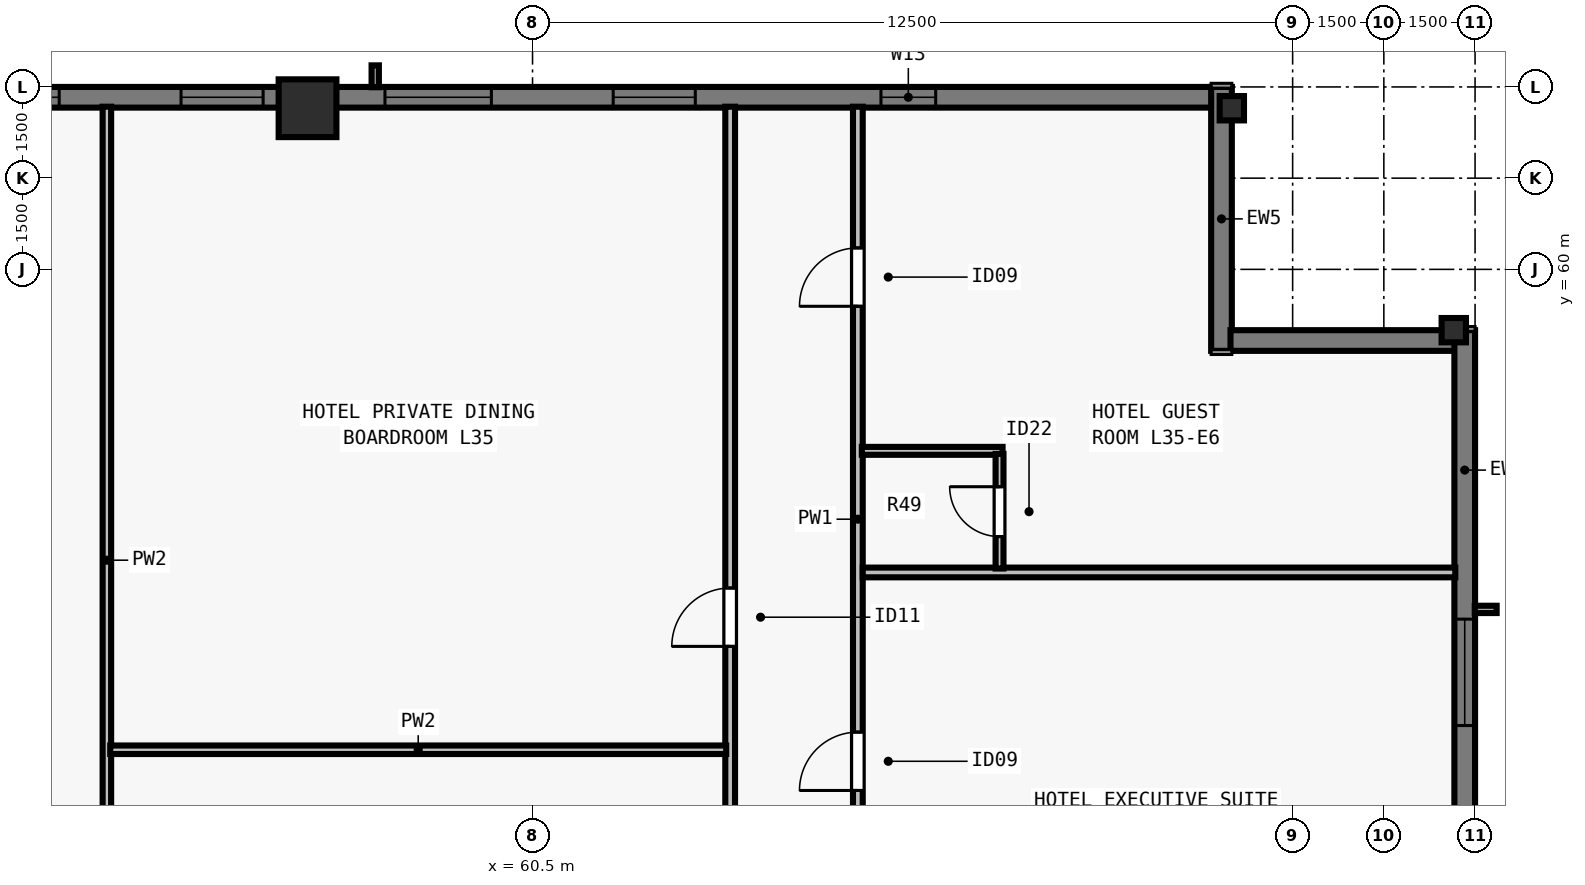
"""IFC4 building model, lengths in metres.
Left out: names, types, materials, properties, quantities, classifications, styles, units other than length and angle.
Written with IfcOpenShell. Run it as: python <this file> out.ifc"""

import sys

from ifc_helpers import new_model, si_unit, direction, frame, frame_2d, origin, origin_2d, place, context, subcontext, project, spatial, rectangle, i_section, extrude, element, fill, save


model = new_model("IFC4")
c1 = context("Model", 3, precision=1e-05, world=origin(), true_north=direction((0.0, 1.0)))
c2 = subcontext(c1, "Body", "Model", "MODEL_VIEW")
j1 = project(units=[si_unit("LENGTHUNIT", "METRE"), si_unit("PLANEANGLEUNIT", "RADIAN")], contexts=[c1])
p1 = place(None, origin())
s1 = spatial("IfcSite", under=j1, at=p1, CompositionType="ELEMENT")
p2 = place(p1, origin())
s2 = spatial("IfcBuilding", under=s1, at=p2, CompositionType="ELEMENT")
p3 = place(p2, frame((0.0, 0.0, 130.5)))
s3 = spatial("IfcBuildingStorey", under=s2, at=p3, CompositionType="ELEMENT", Elevation=130.5)
for number, where, z_axis, x_axis in (
    (1, (75.65, 59.0, 0.0), (0.0, 0.0, 1.0), (0.0, 1.0, 0.0)),
    (2, (72.0, 62.65, 0.0), (0.0, 0.0, 1.0), (1.0, 0.0, 0.0)),
):
    element("IfcColumn", number, at=place(p3, frame(where, z_axis=z_axis, x_axis=x_axis)), inside=s3, PredefinedType="COLUMN", context=c2, shape_type="SweptSolid", body=[
        extrude(i_section(OverallWidth=0.4, OverallDepth=0.4, WebThickness=0.022, FlangeThickness=0.036, at=origin_2d()), origin(), (0.0, 0.0, 1.0), 3.5),
    ])
p4 = place(p3, frame((56.8, 62.65, 0.0), z_axis=(0.0, 0.0, 1.0), x_axis=(1.0, 0.0, 0.0)))
e3 = element("IfcColumn", 3, at=p4, inside=s3, PredefinedType="COLUMN", context=c2, shape_type="SweptSolid", body=[
    extrude(rectangle(XDim=0.95, YDim=0.95, at=origin_2d()), origin(), (0.0, 0.0, 1.0), 3.5),
])
p5 = place(p3, frame((32.0, 62.83, 0.0), z_axis=(0.0, 0.0, 1.0), x_axis=(1.0, 0.0, 0.0)))
e4 = element("IfcWall", 4, at=p5, inside=s3, PredefinedType="SOLIDWALL", context=c2, shape_type="SweptSolid", body=[
    extrude(rectangle(XDim=39.682, YDim=0.34, at=frame_2d((19.841, 0.0))), origin(), (0.0, 0.0, 1.0), 3.28),
])
p6 = place(p5, frame((4.752, 0.0, 0.8)))
e5 = element("IfcOpeningElement", 5, at=p6, cuts=e4, PredefinedType="OPENING", context=c2, shape_type="SweptSolid", body=[
    extrude(rectangle(XDim=1.75, YDim=1.66, at=frame_2d((0.875, 0.83))), frame((0.0, 0.18, 0.0), z_axis=(0.0, -1.0, 0.0), x_axis=(1.0, 0.0, 0.0)), (0.0, 0.0, 1.0), 0.36),
])
p7 = place(p5, frame((11.859, 0.0, 0.8)))
e6 = element("IfcOpeningElement", 6, at=p7, cuts=e4, PredefinedType="OPENING", context=c2, shape_type="SweptSolid", body=[
    extrude(rectangle(XDim=1.75, YDim=1.66, at=frame_2d((0.875, 0.83))), frame((0.0, 0.18, 0.0), z_axis=(0.0, -1.0, 0.0), x_axis=(1.0, 0.0, 0.0)), (0.0, 0.0, 1.0), 0.36),
])
p8 = place(p5, frame((16.062, 0.0, 0.8)))
e7 = element("IfcOpeningElement", 7, at=p8, cuts=e4, PredefinedType="OPENING", context=c2, shape_type="SweptSolid", body=[
    extrude(rectangle(XDim=1.35, YDim=1.66, at=frame_2d((0.675, 0.83))), frame((0.0, 0.18, 0.0), z_axis=(0.0, -1.0, 0.0), x_axis=(1.0, 0.0, 0.0)), (0.0, 0.0, 1.0), 0.36),
])
p9 = place(p5, frame((18.966, 0.0, 0.8)))
e8 = element("IfcOpeningElement", 8, at=p9, cuts=e4, PredefinedType="OPENING", context=c2, shape_type="SweptSolid", body=[
    extrude(rectangle(XDim=1.75, YDim=1.66, at=frame_2d((0.875, 0.83))), frame((0.0, 0.18, 0.0), z_axis=(0.0, -1.0, 0.0), x_axis=(1.0, 0.0, 0.0)), (0.0, 0.0, 1.0), 0.36),
])
p10 = place(p5, frame((22.719, 0.0, 0.8)))
e9 = element("IfcOpeningElement", 9, at=p10, cuts=e4, PredefinedType="OPENING", context=c2, shape_type="SweptSolid", body=[
    extrude(rectangle(XDim=1.35, YDim=1.66, at=frame_2d((0.675, 0.83))), frame((0.0, 0.18, 0.0), z_axis=(0.0, -1.0, 0.0), x_axis=(1.0, 0.0, 0.0)), (0.0, 0.0, 1.0), 0.36),
])
p11 = place(p5, frame((26.073, 0.0, 0.8)))
e10 = element("IfcOpeningElement", 10, at=p11, cuts=e4, PredefinedType="OPENING", context=c2, shape_type="SweptSolid", body=[
    extrude(rectangle(XDim=1.75, YDim=1.66, at=frame_2d((0.875, 0.83))), frame((0.0, 0.18, 0.0), z_axis=(0.0, -1.0, 0.0), x_axis=(1.0, 0.0, 0.0)), (0.0, 0.0, 1.0), 0.36),
])
p12 = place(p5, frame((29.827, 0.0, 0.8)))
e11 = element("IfcOpeningElement", 11, at=p12, cuts=e4, PredefinedType="OPENING", context=c2, shape_type="SweptSolid", body=[
    extrude(rectangle(XDim=1.35, YDim=1.66, at=frame_2d((0.675, 0.83))), frame((0.0, 0.18, 0.0), z_axis=(0.0, -1.0, 0.0), x_axis=(1.0, 0.0, 0.0)), (0.0, 0.0, 1.0), 0.36),
])
p13 = place(p5, frame((34.23, 0.0, 0.8)))
e12 = element("IfcOpeningElement", 12, at=p13, cuts=e4, PredefinedType="OPENING", context=c2, shape_type="SweptSolid", body=[
    extrude(rectangle(XDim=0.9, YDim=1.66, at=frame_2d((0.45, 0.83))), frame((0.0, 0.18, 0.0), z_axis=(0.0, -1.0, 0.0), x_axis=(1.0, 0.0, 0.0)), (0.0, 0.0, 1.0), 0.36),
])
p14 = place(p3, frame((71.83, 63.0, 0.0), z_axis=(0.0, 0.0, 1.0), x_axis=(0.0, -1.0, 0.0)))
e13 = element("IfcWall", 13, at=p14, inside=s3, PredefinedType="SOLIDWALL", context=c2, shape_type="SweptSolid", body=[
    extrude(rectangle(XDim=4.34, YDim=0.34, at=frame_2d((2.17, 0.0))), origin(), (0.0, 0.0, 1.0), 3.28),
])
p15 = place(p3, frame((71.978, 58.83, 0.0), z_axis=(0.0, 0.0, 1.0), x_axis=(1.0, 0.0, 0.0)))
e14 = element("IfcWall", 14, at=p15, inside=s3, PredefinedType="SOLIDWALL", context=c2, shape_type="SweptSolid", body=[
    extrude(rectangle(XDim=3.704, YDim=0.34, at=frame_2d((1.852, 0.0))), origin(), (0.0, 0.0, 1.0), 3.28),
])
p16 = place(p3, frame((75.83, 59.0, 0.0), z_axis=(0.0, 0.0, 1.0), x_axis=(0.0, -1.0, 0.0)))
e15 = element("IfcWall", 15, at=p16, inside=s3, PredefinedType="SOLIDWALL", context=c2, shape_type="SweptSolid", body=[
    extrude(rectangle(XDim=39.682, YDim=0.34, at=frame_2d((19.841, 0.0))), origin(), (0.0, 0.0, 1.0), 3.28),
])
p17 = place(p16, frame((4.752, 0.0, 0.8)))
e16 = element("IfcOpeningElement", 16, at=p17, cuts=e15, PredefinedType="OPENING", context=c2, shape_type="SweptSolid", body=[
    extrude(rectangle(XDim=1.75, YDim=1.66, at=frame_2d((0.875, 0.83))), frame((0.0, 0.18, 0.0), z_axis=(0.0, -1.0, 0.0), x_axis=(1.0, 0.0, 0.0)), (0.0, 0.0, 1.0), 0.36),
])
p18 = place(p16, frame((8.505, 0.0, 0.8)))
e17 = element("IfcOpeningElement", 17, at=p18, cuts=e15, PredefinedType="OPENING", context=c2, shape_type="SweptSolid", body=[
    extrude(rectangle(XDim=1.35, YDim=1.66, at=frame_2d((0.675, 0.83))), frame((0.0, 0.18, 0.0), z_axis=(0.0, -1.0, 0.0), x_axis=(1.0, 0.0, 0.0)), (0.0, 0.0, 1.0), 0.36),
])
p19 = place(p16, frame((12.709, 0.0, 0.8)))
e18 = element("IfcOpeningElement", 18, at=p19, cuts=e15, PredefinedType="OPENING", context=c2, shape_type="SweptSolid", body=[
    extrude(rectangle(XDim=1.75, YDim=1.66, at=frame_2d((0.875, 0.83))), frame((0.0, 0.18, 0.0), z_axis=(0.0, -1.0, 0.0), x_axis=(1.0, 0.0, 0.0)), (0.0, 0.0, 1.0), 0.36),
])
p20 = place(p16, frame((16.062, 0.0, 0.8)))
e19 = element("IfcOpeningElement", 19, at=p20, cuts=e15, PredefinedType="OPENING", context=c2, shape_type="SweptSolid", body=[
    extrude(rectangle(XDim=1.35, YDim=1.66, at=frame_2d((0.675, 0.83))), frame((0.0, 0.18, 0.0), z_axis=(0.0, -1.0, 0.0), x_axis=(1.0, 0.0, 0.0)), (0.0, 0.0, 1.0), 0.36),
])
p21 = place(p16, frame((20.216, 0.0, 0.8)))
e20 = element("IfcOpeningElement", 20, at=p21, cuts=e15, PredefinedType="OPENING", context=c2, shape_type="SweptSolid", body=[
    extrude(rectangle(XDim=1.75, YDim=1.66, at=frame_2d((0.875, 0.83))), frame((0.0, 0.18, 0.0), z_axis=(0.0, -1.0, 0.0), x_axis=(1.0, 0.0, 0.0)), (0.0, 0.0, 1.0), 0.36),
])
p22 = place(p16, frame((22.719, 0.0, 0.8)))
e21 = element("IfcOpeningElement", 21, at=p22, cuts=e15, PredefinedType="OPENING", context=c2, shape_type="SweptSolid", body=[
    extrude(rectangle(XDim=1.35, YDim=1.66, at=frame_2d((0.675, 0.83))), frame((0.0, 0.18, 0.0), z_axis=(0.0, -1.0, 0.0), x_axis=(1.0, 0.0, 0.0)), (0.0, 0.0, 1.0), 0.36),
])
p23 = place(p16, frame((25.623, 0.0, 0.8)))
e22 = element("IfcOpeningElement", 22, at=p23, cuts=e15, PredefinedType="OPENING", context=c2, shape_type="SweptSolid", body=[
    extrude(rectangle(XDim=1.75, YDim=1.66, at=frame_2d((0.875, 0.83))), frame((0.0, 0.18, 0.0), z_axis=(0.0, -1.0, 0.0), x_axis=(1.0, 0.0, 0.0)), (0.0, 0.0, 1.0), 0.36),
])
p24 = place(p16, frame((29.827, 0.0, 0.8)))
e23 = element("IfcOpeningElement", 23, at=p24, cuts=e15, PredefinedType="OPENING", context=c2, shape_type="SweptSolid", body=[
    extrude(rectangle(XDim=1.35, YDim=1.66, at=frame_2d((0.675, 0.83))), frame((0.0, 0.18, 0.0), z_axis=(0.0, -1.0, 0.0), x_axis=(1.0, 0.0, 0.0)), (0.0, 0.0, 1.0), 0.36),
])
p25 = place(p16, frame((33.18, 0.0, 0.8)))
e24 = element("IfcOpeningElement", 24, at=p25, cuts=e15, PredefinedType="OPENING", context=c2, shape_type="SweptSolid", body=[
    extrude(rectangle(XDim=1.75, YDim=1.66, at=frame_2d((0.875, 0.83))), frame((0.0, 0.18, 0.0), z_axis=(0.0, -1.0, 0.0), x_axis=(1.0, 0.0, 0.0)), (0.0, 0.0, 1.0), 0.36),
])
p26 = place(p16, frame((35.83, 0.0, 0.8)))
e25 = element("IfcOpeningElement", 25, at=p26, cuts=e15, PredefinedType="OPENING", context=c2, shape_type="SweptSolid", body=[
    extrude(rectangle(XDim=0.9, YDim=1.66, at=frame_2d((0.45, 0.83))), frame((0.0, 0.18, 0.0), z_axis=(0.0, -1.0, 0.0), x_axis=(1.0, 0.0, 0.0)), (0.0, 0.0, 1.0), 0.36),
])
p27 = place(p3, frame((65.85, 15.325, 0.0), z_axis=(0.0, 0.0, 1.0), x_axis=(0.0, 1.0, 0.0)))
e26 = element("IfcWall", 26, at=p27, inside=s3, PredefinedType="PARTITIONING", context=c2, shape_type="SweptSolid", body=[
    extrude(rectangle(XDim=47.35, YDim=0.16, at=frame_2d((23.675, 0.0))), origin(), (0.0, 0.0, 1.0), 2.555),
])
p28 = place(p27, frame((4.993, 0.0, 0.0)))
e27 = element("IfcOpeningElement", 27, at=p28, cuts=e26, PredefinedType="OPENING", context=c2, shape_type="SweptSolid", body=[
    extrude(rectangle(XDim=0.96, YDim=2.15, at=frame_2d((0.48, 1.075))), frame((0.0, 0.09, 0.0), z_axis=(0.0, -1.0, 0.0), x_axis=(1.0, 0.0, 0.0)), (0.0, 0.0, 1.0), 0.18),
])
p29 = place(p27, frame((12.525, 0.0, 0.0)))
e28 = element("IfcOpeningElement", 28, at=p29, cuts=e26, PredefinedType="OPENING", context=c2, shape_type="SweptSolid", body=[
    extrude(rectangle(XDim=0.96, YDim=2.15, at=frame_2d((0.48, 1.075))), frame((0.0, 0.09, 0.0), z_axis=(0.0, -1.0, 0.0), x_axis=(1.0, 0.0, 0.0)), (0.0, 0.0, 1.0), 0.18),
])
p30 = place(p27, frame((20.385, 0.0, 0.0)))
e29 = element("IfcOpeningElement", 29, at=p30, cuts=e26, PredefinedType="OPENING", context=c2, shape_type="SweptSolid", body=[
    extrude(rectangle(XDim=0.96, YDim=2.15, at=frame_2d((0.48, 1.075))), frame((0.0, 0.09, 0.0), z_axis=(0.0, -1.0, 0.0), x_axis=(1.0, 0.0, 0.0)), (0.0, 0.0, 1.0), 0.18),
])
p31 = place(p27, frame((28.246, 0.0, 0.0)))
e30 = element("IfcOpeningElement", 30, at=p31, cuts=e26, PredefinedType="OPENING", context=c2, shape_type="SweptSolid", body=[
    extrude(rectangle(XDim=0.96, YDim=2.15, at=frame_2d((0.48, 1.075))), frame((0.0, 0.09, 0.0), z_axis=(0.0, -1.0, 0.0), x_axis=(1.0, 0.0, 0.0)), (0.0, 0.0, 1.0), 0.18),
])
p32 = place(p27, frame((36.105, 0.0, 0.0)))
e31 = element("IfcOpeningElement", 31, at=p32, cuts=e26, PredefinedType="OPENING", context=c2, shape_type="SweptSolid", body=[
    extrude(rectangle(XDim=0.96, YDim=2.15, at=frame_2d((0.48, 1.075))), frame((0.0, 0.09, 0.0), z_axis=(0.0, -1.0, 0.0), x_axis=(1.0, 0.0, 0.0)), (0.0, 0.0, 1.0), 0.18),
])
p33 = place(p27, frame((44.068, 0.0, 0.0)))
e32 = element("IfcOpeningElement", 32, at=p33, cuts=e26, PredefinedType="OPENING", context=c2, shape_type="SweptSolid", body=[
    extrude(rectangle(XDim=0.96, YDim=2.15, at=frame_2d((0.48, 1.075))), frame((0.0, 0.09, 0.0), z_axis=(0.0, -1.0, 0.0), x_axis=(1.0, 0.0, 0.0)), (0.0, 0.0, 1.0), 0.18),
])
p34 = place(p3, frame((63.75, 47.6, 0.0), z_axis=(0.0, 0.0, 1.0), x_axis=(0.0, 1.0, 0.0)))
e33 = element("IfcWall", 33, at=p34, inside=s3, PredefinedType="PARTITIONING", context=c2, shape_type="SweptSolid", body=[
    extrude(rectangle(XDim=15.075, YDim=0.16, at=frame_2d((7.538, 0.0))), origin(), (0.0, 0.0, 1.0), 2.555),
])
p35 = place(p34, frame((1.6, 0.0, 0.0)))
e34 = element("IfcOpeningElement", 34, at=p35, cuts=e33, PredefinedType="OPENING", context=c2, shape_type="SweptSolid", body=[
    extrude(rectangle(XDim=0.92, YDim=2.12, at=frame_2d((0.46, 1.06))), frame((0.0, 0.09, 0.0), z_axis=(0.0, -1.0, 0.0), x_axis=(1.0, 0.0, 0.0)), (0.0, 0.0, 1.0), 0.18),
])
p36 = place(p34, frame((6.2, 0.0, 0.0)))
e35 = element("IfcOpeningElement", 35, at=p36, cuts=e33, PredefinedType="OPENING", context=c2, shape_type="SweptSolid", body=[
    extrude(rectangle(XDim=0.96, YDim=2.12, at=frame_2d((0.48, 1.06))), frame((0.0, 0.09, 0.0), z_axis=(0.0, -1.0, 0.0), x_axis=(1.0, 0.0, 0.0)), (0.0, 0.0, 1.0), 0.18),
])
p37 = place(p3, frame((53.5, 47.76, 0.0), z_axis=(0.0, 0.0, 1.0), x_axis=(0.0, 1.0, 0.0)))
e36 = element("IfcWall", 36, at=p37, inside=s3, PredefinedType="PARTITIONING", context=c2, shape_type="SweptSolid", body=[
    extrude(rectangle(XDim=14.915, YDim=0.14, at=frame_2d((7.458, 0.0))), origin(), (0.0, 0.0, 1.0), 2.896),
])
p38 = place(p3, frame((53.555, 52.1, 0.0), z_axis=(0.0, 0.0, 1.0), x_axis=(1.0, 0.0, 0.0)))
e37 = element("IfcWall", 37, at=p38, inside=s3, PredefinedType="PARTITIONING", context=c2, shape_type="SweptSolid", body=[
    extrude(rectangle(XDim=10.13, YDim=0.14, at=frame_2d((5.065, 0.0))), origin(), (0.0, 0.0, 1.0), 3.28),
])
p39 = place(p3, frame((65.93, 55.016, 0.0), z_axis=(0.0, 0.0, 1.0), x_axis=(1.0, 0.0, 0.0)))
e38 = element("IfcWall", 38, at=p39, inside=s3, PredefinedType="PARTITIONING", context=c2, shape_type="SweptSolid", body=[
    extrude(rectangle(XDim=9.745, YDim=0.16, at=frame_2d((4.873, 0.0))), origin(), (0.0, 0.0, 1.0), 2.896),
])
p40 = place(p3, frame((65.915, 57.016, 0.0), z_axis=(0.0, 0.0, 1.0), x_axis=(1.0, 0.0, 0.0)))
e39 = element("IfcWall", 39, at=p40, inside=s3, PredefinedType="PLUMBINGWALL", context=c2, shape_type="SweptSolid", body=[
    extrude(rectangle(XDim=2.315, YDim=0.13, at=frame_2d((1.157, 0.0))), origin(), (0.0, 0.0, 1.0), 3.28),
])
p41 = place(p3, frame((68.18, 55.081, 0.0), z_axis=(0.0, 0.0, 1.0), x_axis=(0.0, 1.0, 0.0)))
e40 = element("IfcWall", 40, at=p41, inside=s3, PredefinedType="PLUMBINGWALL", context=c2, shape_type="SweptSolid", body=[
    extrude(rectangle(XDim=1.885, YDim=0.13, at=frame_2d((0.942, 0.0))), origin(), (0.0, 0.0, 1.0), 3.28),
])
p42 = place(p41, frame((0.525, 0.0, 0.0)))
e41 = element("IfcOpeningElement", 41, at=p42, cuts=e40, PredefinedType="OPENING", context=c2, shape_type="SweptSolid", body=[
    extrude(rectangle(XDim=0.82, YDim=2.1, at=frame_2d((0.41, 1.05))), frame((0.0, 0.075, 0.0), z_axis=(0.0, -1.0, 0.0), x_axis=(1.0, 0.0, 0.0)), (0.0, 0.0, 1.0), 0.15),
])
p43 = place(p9, origin())
e42 = element("IfcWindow", 42, at=p43, inside=s3, PartitioningType="SINGLE_PANEL", PredefinedType="WINDOW", context=c2, shape_type="SweptSolid", body=[
    extrude(rectangle(XDim=1.75, YDim=1.66, at=frame_2d((0.875, 0.83))), frame((0.0, -0.05, 0.0), z_axis=(0.0, -1.0, 0.0), x_axis=(1.0, 0.0, 0.0)), (0.0, 0.0, 1.0), 0.06),
])
fill(e8, e42)
p44 = place(p10, origin())
e43 = element("IfcWindow", 43, at=p44, inside=s3, PartitioningType="SINGLE_PANEL", PredefinedType="WINDOW", context=c2, shape_type="SweptSolid", body=[
    extrude(rectangle(XDim=1.35, YDim=1.66, at=frame_2d((0.675, 0.83))), frame((0.0, -0.05, 0.0), z_axis=(0.0, -1.0, 0.0), x_axis=(1.0, 0.0, 0.0)), (0.0, 0.0, 1.0), 0.06),
])
fill(e9, e43)
p45 = place(p11, origin())
e44 = element("IfcWindow", 44, at=p45, inside=s3, PartitioningType="SINGLE_PANEL", PredefinedType="WINDOW", context=c2, shape_type="SweptSolid", body=[
    extrude(rectangle(XDim=1.75, YDim=1.66, at=frame_2d((0.875, 0.83))), frame((0.0, -0.05, 0.0), z_axis=(0.0, -1.0, 0.0), x_axis=(1.0, 0.0, 0.0)), (0.0, 0.0, 1.0), 0.06),
])
fill(e10, e44)
p46 = place(p12, origin())
e45 = element("IfcWindow", 45, at=p46, inside=s3, PartitioningType="SINGLE_PANEL", PredefinedType="WINDOW", context=c2, shape_type="SweptSolid", body=[
    extrude(rectangle(XDim=1.35, YDim=1.66, at=frame_2d((0.675, 0.83))), frame((0.0, -0.05, 0.0), z_axis=(0.0, -1.0, 0.0), x_axis=(1.0, 0.0, 0.0)), (0.0, 0.0, 1.0), 0.06),
])
fill(e11, e45)
p47 = place(p17, origin())
e46 = element("IfcWindow", 46, at=p47, inside=s3, PartitioningType="SINGLE_PANEL", PredefinedType="WINDOW", context=c2, shape_type="SweptSolid", body=[
    extrude(rectangle(XDim=1.75, YDim=1.66, at=frame_2d((0.875, 0.83))), frame((0.0, -0.05, 0.0), z_axis=(0.0, -1.0, 0.0), x_axis=(1.0, 0.0, 0.0)), (0.0, 0.0, 1.0), 0.06),
])
fill(e16, e46)
p48 = place(p13, origin())
e47 = element("IfcWindow", 47, at=p48, inside=s3, PartitioningType="SINGLE_PANEL", PredefinedType="WINDOW", context=c2, shape_type="SweptSolid", body=[
    extrude(rectangle(XDim=0.9, YDim=1.66, at=frame_2d((0.45, 0.83))), frame((0.0, -0.04, 0.0), z_axis=(0.0, -1.0, 0.0), x_axis=(1.0, 0.0, 0.0)), (0.0, 0.0, 1.0), 0.06),
])
fill(e12, e47)
p49 = place(p36, origin())
e48 = element("IfcDoor", 48, at=p49, inside=s3, OperationType="SINGLE_SWING_LEFT", PredefinedType="DOOR", context=c2, shape_type="SweptSolid", body=[
    extrude(rectangle(XDim=0.96, YDim=2.12, at=frame_2d((0.48, 1.06))), frame((0.0, 0.025, 0.0), z_axis=(0.0, -1.0, 0.0), x_axis=(1.0, 0.0, 0.0)), (0.0, 0.0, 1.0), 0.05),
])
fill(e35, e48)
p50 = place(p32, origin())
e49 = element("IfcDoor", 49, at=p50, inside=s3, OperationType="SINGLE_SWING_LEFT", PredefinedType="DOOR", context=c2, shape_type="SweptSolid", body=[
    extrude(rectangle(XDim=0.96, YDim=2.15, at=frame_2d((0.48, 1.075))), frame((0.0, 0.025, 0.0), z_axis=(0.0, -1.0, 0.0), x_axis=(1.0, 0.0, 0.0)), (0.0, 0.0, 1.0), 0.05),
])
fill(e31, e49)
p51 = place(p42, origin())
e50 = element("IfcDoor", 50, at=p51, inside=s3, OperationType="SINGLE_SWING_RIGHT", PredefinedType="DOOR", context=c2, shape_type="SweptSolid", body=[
    extrude(rectangle(XDim=0.82, YDim=2.1, at=frame_2d((0.41, 1.05))), frame((0.0, 0.025, 0.0), z_axis=(0.0, -1.0, 0.0), x_axis=(1.0, 0.0, 0.0)), (0.0, 0.0, 1.0), 0.05),
])
fill(e41, e50)
p52 = place(p33, origin())
e51 = element("IfcDoor", 51, at=p52, inside=s3, OperationType="SINGLE_SWING_LEFT", PredefinedType="DOOR", context=c2, shape_type="SweptSolid", body=[
    extrude(rectangle(XDim=0.96, YDim=2.15, at=frame_2d((0.48, 1.075))), frame((0.0, 0.025, 0.0), z_axis=(0.0, -1.0, 0.0), x_axis=(1.0, 0.0, 0.0)), (0.0, 0.0, 1.0), 0.05),
])
fill(e32, e51)
save(model, sys.argv[1])
